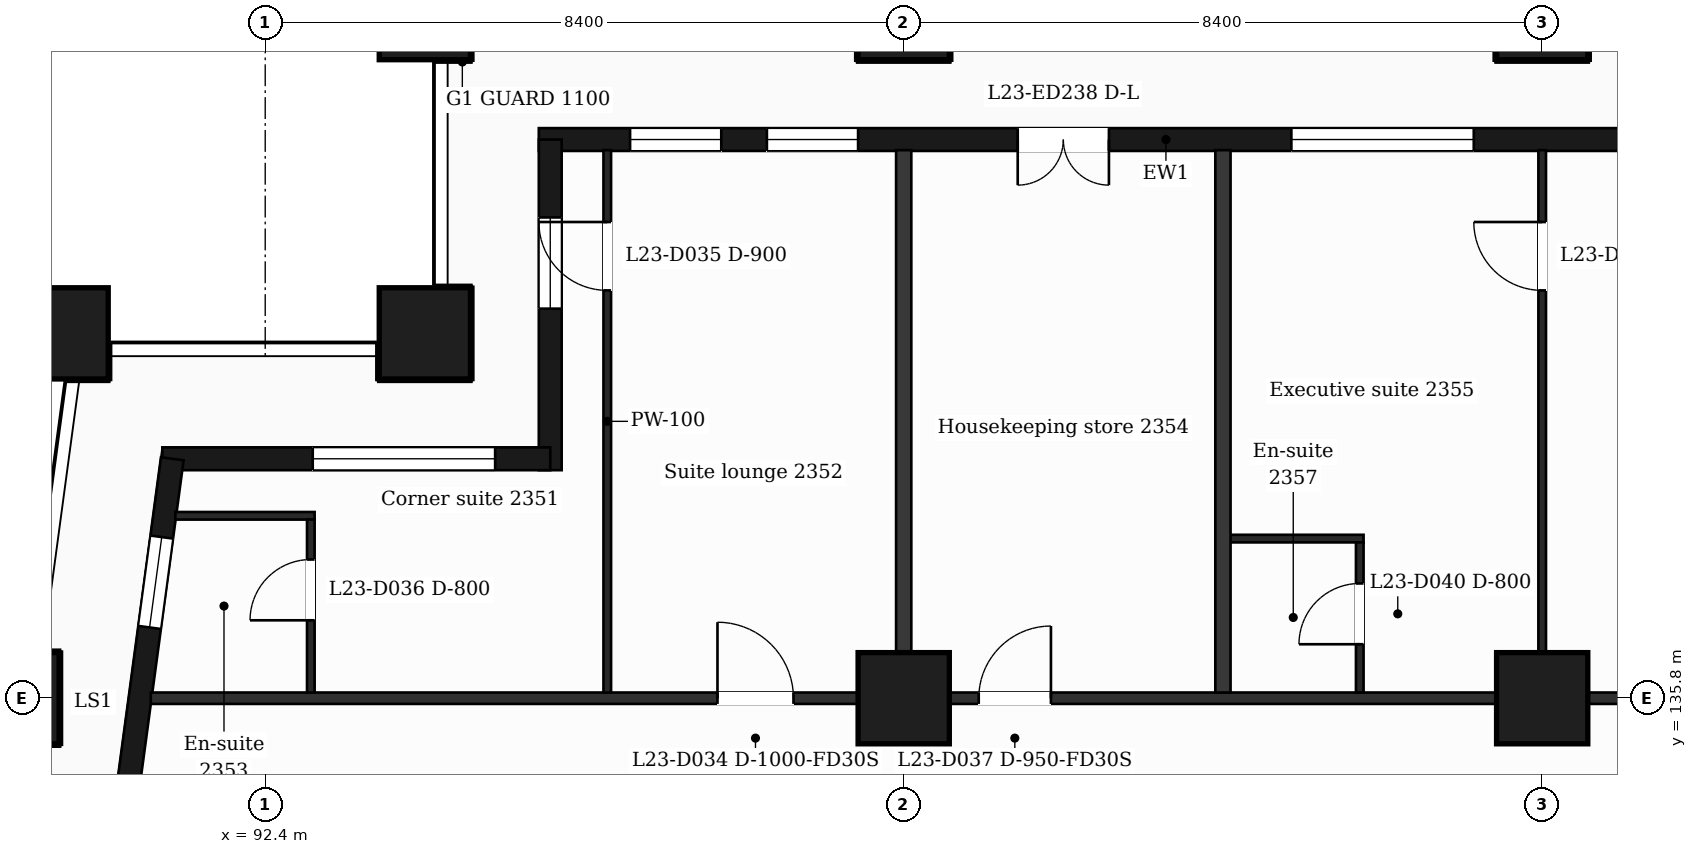
"""IFC4 building model, lengths in metres.
Left out: names, types, materials, properties, quantities, classifications, styles, units other than length and angle.
Written with IfcOpenShell. Run it as: python <this file> out.ifc"""

import sys

from ifc_helpers import new_model, si_unit, direction, frame, frame_2d, origin, origin_2d, place, context, subcontext, project, spatial, rectangle, extrude, element, fill, save


model = new_model("IFC4")
c1 = context("Model", 3, precision=1e-05, world=origin(), true_north=direction((0.0, 1.0)))
c2 = subcontext(c1, "Body", "Model", "MODEL_VIEW")
j1 = project(units=[si_unit("LENGTHUNIT", "METRE"), si_unit("PLANEANGLEUNIT", "RADIAN")], contexts=[c1])
p1 = place(None, origin())
s1 = spatial("IfcSite", under=j1, at=p1, CompositionType="ELEMENT")
p2 = place(p1, origin())
s2 = spatial("IfcBuilding", under=s1, at=p2, CompositionType="ELEMENT")
p3 = place(p2, frame((0.0, 0.0, 102.1)))
s3 = spatial("IfcBuildingStorey", under=s2, at=p3, CompositionType="ELEMENT", Elevation=102.1)
for number, where, z_axis, x_axis in (
    (1, (94.5, 140.6, 0.0), (0.0, 0.0, 1.0), (1.0, 0.0, 0.0)),
    (2, (89.735, 140.6, 0.0), (0.0, 0.0, 1.0), (1.0, 0.0, 0.0)),
    (3, (100.8, 135.8, 0.0), (0.0, 0.0, 1.0), (1.0, 0.0, 0.0)),
    (4, (109.2, 135.8, 0.0), (0.0, 0.0, 1.0), (1.0, 0.0, 0.0)),
    (5, (89.088, 135.8, 0.0), (0.0, 0.0, 1.0), (1.0, 0.0, 0.0)),
    (6, (100.8, 144.8, 0.0), (0.0, 0.0, 1.0), (1.0, 0.0, 0.0)),
    (7, (109.2, 144.8, 0.0), (0.0, 0.0, 1.0), (1.0, 0.0, 0.0)),
    (8, (94.5, 144.8, 0.0), (0.0, 0.0, 1.0), (1.0, 0.0, 0.0)),
):
    element("IfcColumn", number, at=place(p3, frame(where, z_axis=z_axis, x_axis=x_axis)), inside=s3, PredefinedType="COLUMN", context=c2, shape_type="SweptSolid", body=[
        extrude(rectangle(XDim=1.2, YDim=1.2, at=origin_2d()), origin(), (0.0, 0.0, 1.0), 3.7),
    ])
p4 = place(p3, frame((112.5, 143.15, 0.0), z_axis=(0.0, 0.0, 1.0), x_axis=(-1.0, 0.0, 0.0)))
e9 = element("IfcWall", 9, at=p4, inside=s3, PredefinedType="SOLIDWALL", context=c2, shape_type="SweptSolid", body=[
    extrude(rectangle(XDim=16.5, YDim=0.3, at=frame_2d((8.25, 0.0))), origin(), (0.0, 0.0, 1.0), 3.38),
])
p5 = place(p4, frame((1.1, 0.0, 0.9)))
e10 = element("IfcOpeningElement", 10, at=p5, cuts=e9, PredefinedType="OPENING", context=c2, shape_type="SweptSolid", body=[
    extrude(rectangle(XDim=1.2, YDim=2.1, at=frame_2d((0.6, 1.05))), frame((0.0, 0.16, 0.0), z_axis=(0.0, -1.0, 0.0), x_axis=(1.0, 0.0, 0.0)), (0.0, 0.0, 1.0), 0.32),
])
p6 = place(p4, frame((4.2, 0.0, 0.9)))
e11 = element("IfcOpeningElement", 11, at=p6, cuts=e9, PredefinedType="OPENING", context=c2, shape_type="SweptSolid", body=[
    extrude(rectangle(XDim=2.4, YDim=2.1, at=frame_2d((1.2, 1.05))), frame((0.0, 0.16, 0.0), z_axis=(0.0, -1.0, 0.0), x_axis=(1.0, 0.0, 0.0)), (0.0, 0.0, 1.0), 0.32),
])
p7 = place(p4, frame((9.0, 0.0, 0.0)))
e12 = element("IfcOpeningElement", 12, at=p7, cuts=e9, PredefinedType="OPENING", context=c2, shape_type="SweptSolid", body=[
    extrude(rectangle(XDim=1.2, YDim=2.4, at=frame_2d((0.6, 1.2))), frame((0.0, 0.16, 0.0), z_axis=(0.0, -1.0, 0.0), x_axis=(1.0, 0.0, 0.0)), (0.0, 0.0, 1.0), 0.32),
])
p8 = place(p4, frame((12.3, 0.0, 0.9)))
e13 = element("IfcOpeningElement", 13, at=p8, cuts=e9, PredefinedType="OPENING", context=c2, shape_type="SweptSolid", body=[
    extrude(rectangle(XDim=1.2, YDim=2.1, at=frame_2d((0.6, 1.05))), frame((0.0, 0.16, 0.0), z_axis=(0.0, -1.0, 0.0), x_axis=(1.0, 0.0, 0.0)), (0.0, 0.0, 1.0), 0.32),
])
p9 = place(p4, frame((14.1, 0.0, 0.9)))
e14 = element("IfcOpeningElement", 14, at=p9, cuts=e9, PredefinedType="OPENING", context=c2, shape_type="SweptSolid", body=[
    extrude(rectangle(XDim=1.2, YDim=2.1, at=frame_2d((0.6, 1.05))), frame((0.0, 0.16, 0.0), z_axis=(0.0, -1.0, 0.0), x_axis=(1.0, 0.0, 0.0)), (0.0, 0.0, 1.0), 0.32),
])
p10 = place(p3, frame((96.15, 143.15, 0.0), z_axis=(0.0, 0.0, 1.0), x_axis=(0.0, -1.0, 0.0)))
e15 = element("IfcWall", 15, at=p10, inside=s3, PredefinedType="SOLIDWALL", context=c2, shape_type="SweptSolid", body=[
    extrude(rectangle(XDim=4.35, YDim=0.3, at=frame_2d((2.175, 0.0))), origin(), (0.0, 0.0, 1.0), 3.38),
])
p11 = place(p10, frame((1.025, 0.0, 0.9)))
e16 = element("IfcOpeningElement", 16, at=p11, cuts=e15, PredefinedType="OPENING", context=c2, shape_type="SweptSolid", body=[
    extrude(rectangle(XDim=1.2, YDim=2.1, at=frame_2d((0.6, 1.05))), frame((0.0, 0.16, 0.0), z_axis=(0.0, -1.0, 0.0), x_axis=(1.0, 0.0, 0.0)), (0.0, 0.0, 1.0), 0.32),
])
p12 = place(p3, frame((96.15, 138.95, 0.0), z_axis=(0.0, 0.0, 1.0), x_axis=(-1.0, 0.0, 0.0)))
e17 = element("IfcWall", 17, at=p12, inside=s3, PredefinedType="SOLIDWALL", context=c2, shape_type="SweptSolid", body=[
    extrude(rectangle(XDim=5.104, YDim=0.3, at=frame_2d((2.552, 0.0))), origin(), (0.0, 0.0, 1.0), 3.38),
])
p13 = place(p12, frame((0.725, 0.0, 0.9)))
e18 = element("IfcOpeningElement", 18, at=p13, cuts=e17, PredefinedType="OPENING", context=c2, shape_type="SweptSolid", body=[
    extrude(rectangle(XDim=2.4, YDim=2.1, at=frame_2d((1.2, 1.05))), frame((0.0, 0.16, 0.0), z_axis=(0.0, -1.0, 0.0), x_axis=(1.0, 0.0, 0.0)), (0.0, 0.0, 1.0), 0.32),
])
p14 = place(p3, frame((91.177, 138.95, 0.0), z_axis=(0.0, 0.0, 1.0), x_axis=(-0.133426664613, -0.991058689065, 0.0)))
e19 = element("IfcWall", 19, at=p14, inside=s3, PredefinedType="SOLIDWALL", context=c2, shape_type="SweptSolid", body=[
    extrude(rectangle(XDim=6.609, YDim=0.3, at=frame_2d((3.305, 0.0))), origin(), (0.0, 0.0, 1.0), 3.38),
])
p15 = place(p14, frame((1.039, 0.0, 0.9)))
e20 = element("IfcOpeningElement", 20, at=p15, cuts=e19, PredefinedType="OPENING", context=c2, shape_type="SweptSolid", body=[
    extrude(rectangle(XDim=1.2, YDim=2.1, at=frame_2d((0.6, 1.05))), frame((0.0, 0.16, 0.0), z_axis=(0.0, -1.0, 0.0), x_axis=(1.0, 0.0, 0.0)), (0.0, 0.0, 1.0), 0.32),
])
p16 = place(p14, frame((4.294, 0.0, 0.0)))
e21 = element("IfcOpeningElement", 21, at=p16, cuts=e19, PredefinedType="OPENING", context=c2, shape_type="SweptSolid", body=[
    extrude(rectangle(XDim=1.2, YDim=2.4, at=frame_2d((0.6, 1.2))), frame((0.0, 0.16, 0.0), z_axis=(0.0, -1.0, 0.0), x_axis=(1.0, 0.0, 0.0)), (0.0, 0.0, 1.0), 0.32),
])
p17 = place(p3, frame((90.895, 135.8, 0.0), z_axis=(0.0, 0.0, 1.0), x_axis=(1.0, 0.0, 0.0)))
e22 = element("IfcWall", 22, at=p17, inside=s3, PredefinedType="PARTITIONING", context=c2, shape_type="SweptSolid", body=[
    extrude(rectangle(XDim=45.011, YDim=0.15, at=frame_2d((22.505, 0.0))), origin(), (0.0, 0.0, 1.0), 3.38),
])
p18 = place(p17, frame((7.455, 0.0, 0.0)))
e23 = element("IfcOpeningElement", 23, at=p18, cuts=e22, PredefinedType="OPENING", context=c2, shape_type="SweptSolid", body=[
    extrude(rectangle(XDim=1.0, YDim=2.1, at=frame_2d((0.5, 1.05))), frame((0.0, 0.085, 0.0), z_axis=(0.0, -1.0, 0.0), x_axis=(1.0, 0.0, 0.0)), (0.0, 0.0, 1.0), 0.17),
])
p19 = place(p17, frame((10.892, 0.0, 0.0)))
e24 = element("IfcOpeningElement", 24, at=p19, cuts=e22, PredefinedType="OPENING", context=c2, shape_type="SweptSolid", body=[
    extrude(rectangle(XDim=0.95, YDim=2.1, at=frame_2d((0.475, 1.05))), frame((0.0, 0.085, 0.0), z_axis=(0.0, -1.0, 0.0), x_axis=(1.0, 0.0, 0.0)), (0.0, 0.0, 1.0), 0.17),
])
p20 = place(p17, frame((23.68, 0.0, 0.0)))
e25 = element("IfcOpeningElement", 25, at=p20, cuts=e22, PredefinedType="OPENING", context=c2, shape_type="SweptSolid", body=[
    extrude(rectangle(XDim=1.0, YDim=2.1, at=frame_2d((0.5, 1.05))), frame((0.0, 0.085, 0.0), z_axis=(0.0, -1.0, 0.0), x_axis=(1.0, 0.0, 0.0)), (0.0, 0.0, 1.0), 0.17),
])
p21 = place(p17, frame((30.318, 0.0, 0.0)))
e26 = element("IfcOpeningElement", 26, at=p21, cuts=e22, PredefinedType="OPENING", context=c2, shape_type="SweptSolid", body=[
    extrude(rectangle(XDim=0.95, YDim=2.1, at=frame_2d((0.475, 1.05))), frame((0.0, 0.085, 0.0), z_axis=(0.0, -1.0, 0.0), x_axis=(1.0, 0.0, 0.0)), (0.0, 0.0, 1.0), 0.17),
])
p22 = place(p17, frame((36.005, 0.0, 0.0)))
e27 = element("IfcOpeningElement", 27, at=p22, cuts=e22, PredefinedType="OPENING", context=c2, shape_type="SweptSolid", body=[
    extrude(rectangle(XDim=1.0, YDim=2.1, at=frame_2d((0.5, 1.05))), frame((0.0, 0.085, 0.0), z_axis=(0.0, -1.0, 0.0), x_axis=(1.0, 0.0, 0.0)), (0.0, 0.0, 1.0), 0.17),
])
p23 = place(p3, frame((105.0, 137.9, 0.0), z_axis=(0.0, 0.0, 1.0), x_axis=(1.0, 0.0, 0.0)))
e28 = element("IfcWall", 28, at=p23, inside=s3, PredefinedType="PARTITIONING", context=c2, shape_type="SweptSolid", body=[
    extrude(rectangle(XDim=1.85, YDim=0.1, at=frame_2d((0.925, 0.0))), origin(), (0.0, 0.0, 1.0), 3.38),
])
p24 = place(p3, frame((91.218, 138.2, 0.0), z_axis=(0.0, 0.0, 1.0), x_axis=(1.0, 0.0, 0.0)))
e29 = element("IfcWall", 29, at=p24, inside=s3, PredefinedType="PARTITIONING", context=c2, shape_type="SweptSolid", body=[
    extrude(rectangle(XDim=1.832, YDim=0.1, at=frame_2d((0.916, 0.0))), origin(), (0.0, 0.0, 1.0), 3.38),
])
p25 = place(p3, frame((93.0, 135.875, 0.0), z_axis=(0.0, 0.0, 1.0), x_axis=(0.0, 1.0, 0.0)))
e30 = element("IfcWall", 30, at=p25, inside=s3, PredefinedType="PARTITIONING", context=c2, shape_type="SweptSolid", body=[
    extrude(rectangle(XDim=2.275, YDim=0.1, at=frame_2d((1.137, 0.0))), origin(), (0.0, 0.0, 1.0), 3.38),
])
p26 = place(p25, frame((0.95, 0.0, 0.0)))
e31 = element("IfcOpeningElement", 31, at=p26, cuts=e30, PredefinedType="OPENING", context=c2, shape_type="SweptSolid", body=[
    extrude(rectangle(XDim=0.8, YDim=2.1, at=frame_2d((0.4, 1.05))), frame((0.0, 0.06, 0.0), z_axis=(0.0, -1.0, 0.0), x_axis=(1.0, 0.0, 0.0)), (0.0, 0.0, 1.0), 0.12),
])
p27 = place(p3, frame((96.9, 135.875, 0.0), z_axis=(0.0, 0.0, 1.0), x_axis=(0.0, 1.0, 0.0)))
e32 = element("IfcWall", 32, at=p27, inside=s3, PredefinedType="PARTITIONING", context=c2, shape_type="SweptSolid", body=[
    extrude(rectangle(XDim=7.135, YDim=0.1, at=frame_2d((3.567, 0.0))), origin(), (0.0, 0.0, 1.0), 3.38),
])
p28 = place(p27, frame((5.29, 0.0, 0.0)))
e33 = element("IfcOpeningElement", 33, at=p28, cuts=e32, PredefinedType="OPENING", context=c2, shape_type="SweptSolid", body=[
    extrude(rectangle(XDim=0.9, YDim=2.1, at=frame_2d((0.45, 1.05))), frame((0.0, 0.06, 0.0), z_axis=(0.0, -1.0, 0.0), x_axis=(1.0, 0.0, 0.0)), (0.0, 0.0, 1.0), 0.12),
])
for number, where, z_axis, x_axis in (
    (34, (100.8, 135.875, 0.0), (0.0, 0.0, 1.0), (0.0, 1.0, 0.0)),
    (35, (105.0, 135.875, 0.0), (0.0, 0.0, 1.0), (0.0, 1.0, 0.0)),
):
    element("IfcWall", number, at=place(p3, frame(where, z_axis=z_axis, x_axis=x_axis)), inside=s3, PredefinedType="PARTITIONING", context=c2, shape_type="SweptSolid", body=[
        extrude(rectangle(XDim=7.135, YDim=0.2, at=frame_2d((3.567, 0.0))), origin(), (0.0, 0.0, 1.0), 3.38),
    ])
p29 = place(p3, frame((106.8, 135.875, 0.0), z_axis=(0.0, 0.0, 1.0), x_axis=(0.0, 1.0, 0.0)))
e36 = element("IfcWall", 36, at=p29, inside=s3, PredefinedType="PARTITIONING", context=c2, shape_type="SweptSolid", body=[
    extrude(rectangle(XDim=1.975, YDim=0.1, at=frame_2d((0.988, 0.0))), origin(), (0.0, 0.0, 1.0), 3.38),
])
p30 = place(p29, frame((0.635, 0.0, 0.0)))
e37 = element("IfcOpeningElement", 37, at=p30, cuts=e36, PredefinedType="OPENING", context=c2, shape_type="SweptSolid", body=[
    extrude(rectangle(XDim=0.8, YDim=2.1, at=frame_2d((0.4, 1.05))), frame((0.0, 0.06, 0.0), z_axis=(0.0, -1.0, 0.0), x_axis=(1.0, 0.0, 0.0)), (0.0, 0.0, 1.0), 0.12),
])
p31 = place(p3, frame((109.2, 135.875, 0.0), z_axis=(0.0, 0.0, 1.0), x_axis=(0.0, 1.0, 0.0)))
e38 = element("IfcWall", 38, at=p31, inside=s3, PredefinedType="PARTITIONING", context=c2, shape_type="SweptSolid", body=[
    extrude(rectangle(XDim=7.135, YDim=0.1, at=frame_2d((3.567, 0.0))), origin(), (0.0, 0.0, 1.0), 3.38),
])
p32 = place(p31, frame((5.29, 0.0, 0.0)))
e39 = element("IfcOpeningElement", 39, at=p32, cuts=e38, PredefinedType="OPENING", context=c2, shape_type="SweptSolid", body=[
    extrude(rectangle(XDim=0.9, YDim=2.1, at=frame_2d((0.45, 1.05))), frame((0.0, 0.06, 0.0), z_axis=(0.0, -1.0, 0.0), x_axis=(1.0, 0.0, 0.0)), (0.0, 0.0, 1.0), 0.12),
])
p33 = place(p5, origin())
e40 = element("IfcWindow", 40, at=p33, inside=s3, PartitioningType="SINGLE_PANEL", PredefinedType="WINDOW", context=c2, shape_type="SweptSolid", body=[
    extrude(rectangle(XDim=1.2, YDim=2.1, at=frame_2d((0.6, 1.05))), frame((0.0, 0.03, 0.0), z_axis=(0.0, -1.0, 0.0), x_axis=(1.0, 0.0, 0.0)), (0.0, 0.0, 1.0), 0.06),
])
fill(e10, e40)
p34 = place(p6, origin())
e41 = element("IfcWindow", 41, at=p34, inside=s3, PartitioningType="SINGLE_PANEL", PredefinedType="WINDOW", context=c2, shape_type="SweptSolid", body=[
    extrude(rectangle(XDim=2.4, YDim=2.1, at=frame_2d((1.2, 1.05))), frame((0.0, 0.03, 0.0), z_axis=(0.0, -1.0, 0.0), x_axis=(1.0, 0.0, 0.0)), (0.0, 0.0, 1.0), 0.06),
])
fill(e11, e41)
p35 = place(p7, origin())
e42 = element("IfcDoor", 42, at=p35, inside=s3, OperationType="DOUBLE_DOOR_SINGLE_SWING", PredefinedType="DOOR", context=c2, shape_type="SweptSolid", body=[
    extrude(rectangle(XDim=1.2, YDim=2.4, at=frame_2d((0.6, 1.2))), frame((0.0, 0.025, 0.0), z_axis=(0.0, -1.0, 0.0), x_axis=(1.0, 0.0, 0.0)), (0.0, 0.0, 1.0), 0.05),
])
fill(e12, e42)
p36 = place(p8, origin())
e43 = element("IfcWindow", 43, at=p36, inside=s3, PartitioningType="SINGLE_PANEL", PredefinedType="WINDOW", context=c2, shape_type="SweptSolid", body=[
    extrude(rectangle(XDim=1.2, YDim=2.1, at=frame_2d((0.6, 1.05))), frame((0.0, 0.03, 0.0), z_axis=(0.0, -1.0, 0.0), x_axis=(1.0, 0.0, 0.0)), (0.0, 0.0, 1.0), 0.06),
])
fill(e13, e43)
p37 = place(p9, origin())
e44 = element("IfcWindow", 44, at=p37, inside=s3, PartitioningType="SINGLE_PANEL", PredefinedType="WINDOW", context=c2, shape_type="SweptSolid", body=[
    extrude(rectangle(XDim=1.2, YDim=2.1, at=frame_2d((0.6, 1.05))), frame((0.0, 0.03, 0.0), z_axis=(0.0, -1.0, 0.0), x_axis=(1.0, 0.0, 0.0)), (0.0, 0.0, 1.0), 0.06),
])
fill(e14, e44)
p38 = place(p11, origin())
e45 = element("IfcWindow", 45, at=p38, inside=s3, PartitioningType="SINGLE_PANEL", PredefinedType="WINDOW", context=c2, shape_type="SweptSolid", body=[
    extrude(rectangle(XDim=1.2, YDim=2.1, at=frame_2d((0.6, 1.05))), frame((0.0, 0.03, 0.0), z_axis=(0.0, -1.0, 0.0), x_axis=(1.0, 0.0, 0.0)), (0.0, 0.0, 1.0), 0.06),
])
fill(e16, e45)
p39 = place(p13, origin())
e46 = element("IfcWindow", 46, at=p39, inside=s3, PartitioningType="SINGLE_PANEL", PredefinedType="WINDOW", context=c2, shape_type="SweptSolid", body=[
    extrude(rectangle(XDim=2.4, YDim=2.1, at=frame_2d((1.2, 1.05))), frame((0.0, 0.03, 0.0), z_axis=(0.0, -1.0, 0.0), x_axis=(1.0, 0.0, 0.0)), (0.0, 0.0, 1.0), 0.06),
])
fill(e18, e46)
p40 = place(p15, origin())
e47 = element("IfcWindow", 47, at=p40, inside=s3, PartitioningType="SINGLE_PANEL", PredefinedType="WINDOW", context=c2, shape_type="SweptSolid", body=[
    extrude(rectangle(XDim=1.2, YDim=2.1, at=frame_2d((0.6, 1.05))), frame((0.0, 0.03, 0.0), z_axis=(0.0, -1.0, 0.0), x_axis=(1.0, 0.0, 0.0)), (0.0, 0.0, 1.0), 0.06),
])
fill(e20, e47)
p41 = place(p18, origin())
e48 = element("IfcDoor", 48, at=p41, inside=s3, OperationType="SINGLE_SWING_LEFT", PredefinedType="DOOR", context=c2, shape_type="SweptSolid", body=[
    extrude(rectangle(XDim=1.0, YDim=2.1, at=frame_2d((0.5, 1.05))), frame((0.0, 0.025, 0.0), z_axis=(0.0, -1.0, 0.0), x_axis=(1.0, 0.0, 0.0)), (0.0, 0.0, 1.0), 0.05),
])
fill(e23, e48)
p42 = place(p28, origin())
e49 = element("IfcDoor", 49, at=p42, inside=s3, OperationType="SINGLE_SWING_RIGHT", PredefinedType="DOOR", context=c2, shape_type="SweptSolid", body=[
    extrude(rectangle(XDim=0.9, YDim=2.1, at=frame_2d((0.45, 1.05))), frame((0.0, 0.025, 0.0), z_axis=(0.0, -1.0, 0.0), x_axis=(1.0, 0.0, 0.0)), (0.0, 0.0, 1.0), 0.05),
])
fill(e33, e49)
p43 = place(p26, origin())
e50 = element("IfcDoor", 50, at=p43, inside=s3, OperationType="SINGLE_SWING_LEFT", PredefinedType="DOOR", context=c2, shape_type="SweptSolid", body=[
    extrude(rectangle(XDim=0.8, YDim=2.1, at=frame_2d((0.4, 1.05))), frame((0.0, 0.025, 0.0), z_axis=(0.0, -1.0, 0.0), x_axis=(1.0, 0.0, 0.0)), (0.0, 0.0, 1.0), 0.05),
])
fill(e31, e50)
p44 = place(p19, origin())
e51 = element("IfcDoor", 51, at=p44, inside=s3, OperationType="SINGLE_SWING_RIGHT", PredefinedType="DOOR", context=c2, shape_type="SweptSolid", body=[
    extrude(rectangle(XDim=0.95, YDim=2.1, at=frame_2d((0.475, 1.05))), frame((0.0, 0.025, 0.0), z_axis=(0.0, -1.0, 0.0), x_axis=(1.0, 0.0, 0.0)), (0.0, 0.0, 1.0), 0.05),
])
fill(e24, e51)
p45 = place(p32, origin())
e52 = element("IfcDoor", 52, at=p45, inside=s3, OperationType="SINGLE_SWING_RIGHT", PredefinedType="DOOR", context=c2, shape_type="SweptSolid", body=[
    extrude(rectangle(XDim=0.9, YDim=2.1, at=frame_2d((0.45, 1.05))), frame((0.0, 0.025, 0.0), z_axis=(0.0, -1.0, 0.0), x_axis=(1.0, 0.0, 0.0)), (0.0, 0.0, 1.0), 0.05),
])
fill(e39, e52)
p46 = place(p30, origin())
e53 = element("IfcDoor", 53, at=p46, inside=s3, OperationType="SINGLE_SWING_LEFT", PredefinedType="DOOR", context=c2, shape_type="SweptSolid", body=[
    extrude(rectangle(XDim=0.8, YDim=2.1, at=frame_2d((0.4, 1.05))), frame((0.0, 0.025, 0.0), z_axis=(0.0, -1.0, 0.0), x_axis=(1.0, 0.0, 0.0)), (0.0, 0.0, 1.0), 0.05),
])
fill(e37, e53)
save(model, sys.argv[1])
